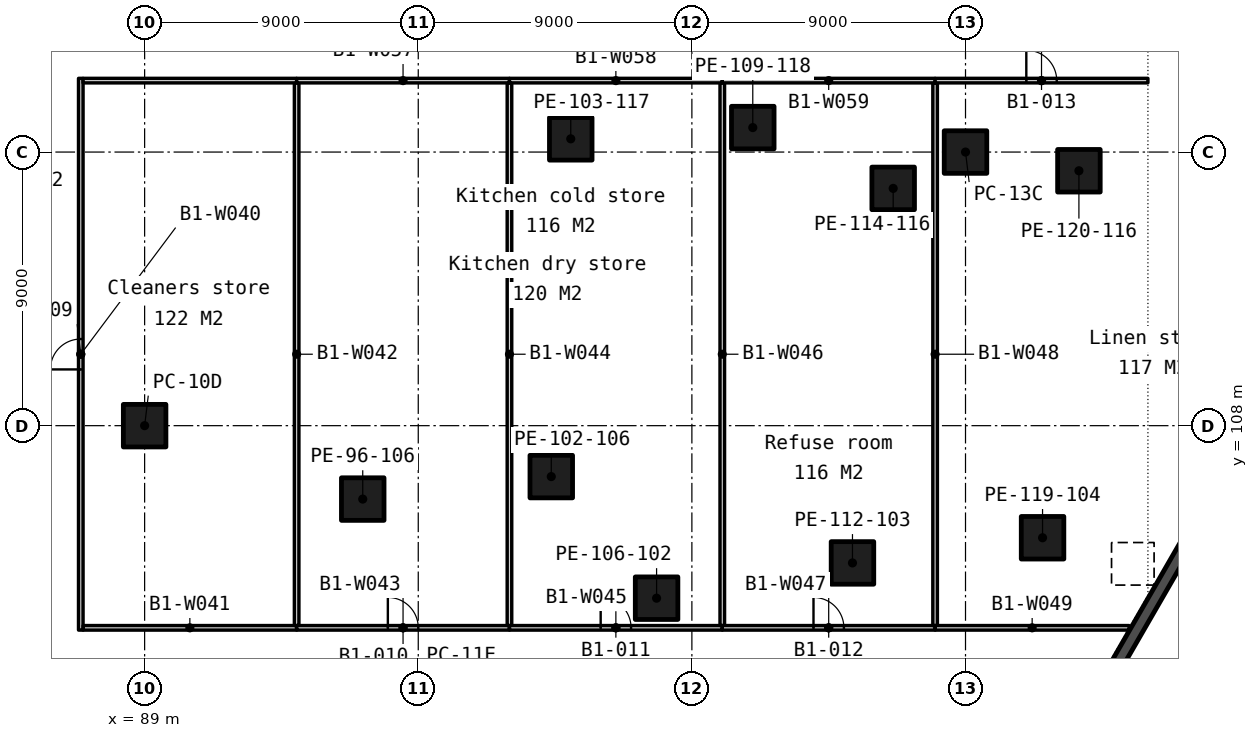
"""IFC4 building model, lengths in metres.
Left out: names, types, materials, properties, quantities, classifications, styles, units other than length and angle.
Written with IfcOpenShell. Run it as: python <this file> out.ifc"""

import sys

from ifc_helpers import new_model, si_unit, direction, frame, frame_2d, origin, origin_2d, place, context, subcontext, project, spatial, rectangle, extrude, element, fill, save


model = new_model("IFC4")
c1 = context("Model", 3, precision=1e-05, world=origin(), true_north=direction((0.0, 1.0)))
c2 = subcontext(c1, "Body", "Model", "MODEL_VIEW")
j1 = project(units=[si_unit("LENGTHUNIT", "METRE"), si_unit("PLANEANGLEUNIT", "RADIAN")], contexts=[c1])
p1 = place(None, origin())
s1 = spatial("IfcSite", under=j1, at=p1, CompositionType="ELEMENT")
p2 = place(p1, origin())
s2 = spatial("IfcBuilding", under=s1, at=p2, CompositionType="ELEMENT")
p3 = place(p2, frame((0.0, 0.0, -4.5)))
s3 = spatial("IfcBuildingStorey", under=s2, at=p3, CompositionType="ELEMENT", Elevation=-4.5)
p4 = place(p3, frame((137.688, 129.089, -0.25), z_axis=(0.0, 0.0, 1.0), x_axis=(-0.499999742059, -0.866025552707, 0.0)))
e1 = element("IfcWall", 1, at=p4, inside=s3, PredefinedType="SOLIDWALL", context=c2, shape_type="SweptSolid", body=[
    extrude(rectangle(XDim=105.659, YDim=0.4, at=frame_2d((52.829, 0.0))), origin(), (0.0, 0.0, 1.0), 4.45),
])
for number, where, z_axis, x_axis in (
    (2, (89.0, 108.0, 0.0), (0.0, 0.0, 1.0), (1.0, 0.0, 0.0)),
    (3, (116.0, 117.0, 0.0), (0.0, 0.0, 1.0), (1.0, 0.0, 0.0)),
    (4, (102.375, 106.325, 0.0), (0.0, 0.0, 1.0), (1.0, 0.0, 0.0)),
    (5, (103.016, 117.435, 0.0), (0.0, 0.0, 1.0), (1.0, 0.0, 0.0)),
    (6, (105.839, 102.325, 0.0), (0.0, 0.0, 1.0), (1.0, 0.0, 0.0)),
    (7, (109.003, 117.805, 0.0), (0.0, 0.0, 1.0), (1.0, 0.0, 0.0)),
    (8, (112.282, 103.485, 0.0), (0.0, 0.0, 1.0), (1.0, 0.0, 0.0)),
    (9, (113.621, 115.805, 0.0), (0.0, 0.0, 1.0), (1.0, 0.0, 0.0)),
    (10, (118.534, 104.313, 0.0), (0.0, 0.0, 1.0), (1.0, 0.0, 0.0)),
    (11, (119.73, 116.385, 0.0), (0.0, 0.0, 1.0), (1.0, 0.0, 0.0)),
    (12, (96.174, 105.585, 0.0), (0.0, 0.0, 1.0), (1.0, 0.0, 0.0)),
):
    element("IfcColumn", number, at=place(p3, frame(where, z_axis=z_axis, x_axis=x_axis)), inside=s3, PredefinedType="COLUMN", context=c2, shape_type="SweptSolid", body=[
        extrude(rectangle(XDim=1.4, YDim=1.4, at=origin_2d()), origin(), (0.0, 0.0, 1.0), 4.5),
    ])
p5 = place(p3, frame((86.9, 101.275, 0.0), z_axis=(0.0, 0.0, 1.0), x_axis=(0.0, 1.0, 0.0)))
e13 = element("IfcWall", 13, at=p5, inside=s3, PredefinedType="PARTITIONING", context=c2, shape_type="SweptSolid", body=[
    extrude(rectangle(XDim=18.15, YDim=0.15, at=frame_2d((9.075, 0.0))), origin(), (0.0, 0.0, 1.0), 4.2),
])
p6 = place(p5, frame((8.575, 0.0, 0.0)))
e14 = element("IfcOpeningElement", 14, at=p6, cuts=e13, PredefinedType="OPENING", context=c2, shape_type="SweptSolid", body=[
    extrude(rectangle(XDim=1.0, YDim=2.1, at=frame_2d((0.5, 1.05))), frame((0.0, 0.085, 0.0), z_axis=(0.0, -1.0, 0.0), x_axis=(1.0, 0.0, 0.0)), (0.0, 0.0, 1.0), 0.17),
])
p7 = place(p3, frame((86.975, 101.35, 0.0), z_axis=(0.0, 0.0, 1.0), x_axis=(1.0, 0.0, 0.0)))
e15 = element("IfcWall", 15, at=p7, inside=s3, PredefinedType="PARTITIONING", context=c2, shape_type="SweptSolid", body=[
    extrude(rectangle(XDim=7.025, YDim=0.15, at=frame_2d((3.512, 0.0))), origin(), (0.0, 0.0, 1.0), 4.2),
])
p8 = place(p3, frame((94.0, 101.425, 0.0), z_axis=(0.0, 0.0, 1.0), x_axis=(0.0, 1.0, 0.0)))
e16 = element("IfcWall", 16, at=p8, inside=s3, PredefinedType="PARTITIONING", context=c2, shape_type="SweptSolid", body=[
    extrude(rectangle(XDim=17.85, YDim=0.15, at=frame_2d((8.925, 0.0))), origin(), (0.0, 0.0, 1.0), 4.2),
])
p9 = place(p3, frame((94.0, 101.35, 0.0), z_axis=(0.0, 0.0, 1.0), x_axis=(1.0, 0.0, 0.0)))
e17 = element("IfcWall", 17, at=p9, inside=s3, PredefinedType="PARTITIONING", context=c2, shape_type="SweptSolid", body=[
    extrude(rectangle(XDim=7.0, YDim=0.15, at=frame_2d((3.5, 0.0))), origin(), (0.0, 0.0, 1.0), 4.2),
])
p10 = place(p9, frame((3.0, 0.0, 0.0)))
e18 = element("IfcOpeningElement", 18, at=p10, cuts=e17, PredefinedType="OPENING", context=c2, shape_type="SweptSolid", body=[
    extrude(rectangle(XDim=1.0, YDim=2.1, at=frame_2d((0.5, 1.05))), frame((0.0, 0.085, 0.0), z_axis=(0.0, -1.0, 0.0), x_axis=(1.0, 0.0, 0.0)), (0.0, 0.0, 1.0), 0.17),
])
p11 = place(p3, frame((101.0, 101.425, 0.0), z_axis=(0.0, 0.0, 1.0), x_axis=(0.0, 1.0, 0.0)))
e19 = element("IfcWall", 19, at=p11, inside=s3, PredefinedType="PARTITIONING", context=c2, shape_type="SweptSolid", body=[
    extrude(rectangle(XDim=17.85, YDim=0.15, at=frame_2d((8.925, 0.0))), origin(), (0.0, 0.0, 1.0), 4.2),
])
p12 = place(p3, frame((101.0, 101.35, 0.0), z_axis=(0.0, 0.0, 1.0), x_axis=(1.0, 0.0, 0.0)))
e20 = element("IfcWall", 20, at=p12, inside=s3, PredefinedType="PARTITIONING", context=c2, shape_type="SweptSolid", body=[
    extrude(rectangle(XDim=7.0, YDim=0.15, at=frame_2d((3.5, 0.0))), origin(), (0.0, 0.0, 1.0), 4.2),
])
p13 = place(p12, frame((3.0, 0.0, 0.0)))
e21 = element("IfcOpeningElement", 21, at=p13, cuts=e20, PredefinedType="OPENING", context=c2, shape_type="SweptSolid", body=[
    extrude(rectangle(XDim=1.0, YDim=2.1, at=frame_2d((0.5, 1.05))), frame((0.0, 0.085, 0.0), z_axis=(0.0, -1.0, 0.0), x_axis=(1.0, 0.0, 0.0)), (0.0, 0.0, 1.0), 0.17),
])
p14 = place(p3, frame((108.0, 101.425, 0.0), z_axis=(0.0, 0.0, 1.0), x_axis=(0.0, 1.0, 0.0)))
e22 = element("IfcWall", 22, at=p14, inside=s3, PredefinedType="PARTITIONING", context=c2, shape_type="SweptSolid", body=[
    extrude(rectangle(XDim=17.85, YDim=0.15, at=frame_2d((8.925, 0.0))), origin(), (0.0, 0.0, 1.0), 4.2),
])
p15 = place(p3, frame((108.0, 101.35, 0.0), z_axis=(0.0, 0.0, 1.0), x_axis=(1.0, 0.0, 0.0)))
e23 = element("IfcWall", 23, at=p15, inside=s3, PredefinedType="PARTITIONING", context=c2, shape_type="SweptSolid", body=[
    extrude(rectangle(XDim=7.0, YDim=0.15, at=frame_2d((3.5, 0.0))), origin(), (0.0, 0.0, 1.0), 4.2),
])
p16 = place(p15, frame((3.0, 0.0, 0.0)))
e24 = element("IfcOpeningElement", 24, at=p16, cuts=e23, PredefinedType="OPENING", context=c2, shape_type="SweptSolid", body=[
    extrude(rectangle(XDim=1.0, YDim=2.1, at=frame_2d((0.5, 1.05))), frame((0.0, 0.085, 0.0), z_axis=(0.0, -1.0, 0.0), x_axis=(1.0, 0.0, 0.0)), (0.0, 0.0, 1.0), 0.17),
])
p17 = place(p3, frame((115.0, 101.425, 0.0), z_axis=(0.0, 0.0, 1.0), x_axis=(0.0, 1.0, 0.0)))
e25 = element("IfcWall", 25, at=p17, inside=s3, PredefinedType="PARTITIONING", context=c2, shape_type="SweptSolid", body=[
    extrude(rectangle(XDim=17.85, YDim=0.15, at=frame_2d((8.925, 0.0))), origin(), (0.0, 0.0, 1.0), 4.2),
])
p18 = place(p3, frame((115.0, 101.35, 0.0), z_axis=(0.0, 0.0, 1.0), x_axis=(1.0, 0.0, 0.0)))
e26 = element("IfcWall", 26, at=p18, inside=s3, PredefinedType="PARTITIONING", context=c2, shape_type="SweptSolid", body=[
    extrude(rectangle(XDim=6.384, YDim=0.15, at=frame_2d((3.192, 0.0))), origin(), (0.0, 0.0, 1.0), 4.2),
])
p19 = place(p3, frame((86.975, 119.35, 0.0), z_axis=(0.0, 0.0, 1.0), x_axis=(1.0, 0.0, 0.0)))
e27 = element("IfcWall", 27, at=p19, inside=s3, PredefinedType="PARTITIONING", context=c2, shape_type="SweptSolid", body=[
    extrude(rectangle(XDim=7.025, YDim=0.15, at=frame_2d((3.512, 0.0))), origin(), (0.0, 0.0, 1.0), 4.2),
])
for number, where, z_axis, x_axis in (
    (28, (94.0, 119.35, 0.0), (0.0, 0.0, 1.0), (1.0, 0.0, 0.0)),
    (29, (101.0, 119.35, 0.0), (0.0, 0.0, 1.0), (1.0, 0.0, 0.0)),
    (30, (108.0, 119.35, 0.0), (0.0, 0.0, 1.0), (1.0, 0.0, 0.0)),
):
    element("IfcWall", number, at=place(p3, frame(where, z_axis=z_axis, x_axis=x_axis)), inside=s3, PredefinedType="PARTITIONING", context=c2, shape_type="SweptSolid", body=[
        extrude(rectangle(XDim=7.0, YDim=0.15, at=frame_2d((3.5, 0.0))), origin(), (0.0, 0.0, 1.0), 4.2),
    ])
p20 = place(p3, frame((115.0, 119.35, 0.0), z_axis=(0.0, 0.0, 1.0), x_axis=(1.0, 0.0, 0.0)))
e31 = element("IfcWall", 31, at=p20, inside=s3, PredefinedType="PARTITIONING", context=c2, shape_type="SweptSolid", body=[
    extrude(rectangle(XDim=7.0, YDim=0.15, at=frame_2d((3.5, 0.0))), origin(), (0.0, 0.0, 1.0), 4.2),
])
p21 = place(p20, frame((3.0, 0.0, 0.0)))
e32 = element("IfcOpeningElement", 32, at=p21, cuts=e31, PredefinedType="OPENING", context=c2, shape_type="SweptSolid", body=[
    extrude(rectangle(XDim=1.0, YDim=2.1, at=frame_2d((0.5, 1.05))), frame((0.0, 0.085, 0.0), z_axis=(0.0, -1.0, 0.0), x_axis=(1.0, 0.0, 0.0)), (0.0, 0.0, 1.0), 0.17),
])
p22 = place(p6, origin())
e33 = element("IfcDoor", 33, at=p22, inside=s3, OperationType="SINGLE_SWING_LEFT", PredefinedType="DOOR", context=c2, shape_type="SweptSolid", body=[
    extrude(rectangle(XDim=1.0, YDim=2.1, at=frame_2d((0.5, 1.05))), frame((0.0, 0.025, 0.0), z_axis=(0.0, -1.0, 0.0), x_axis=(1.0, 0.0, 0.0)), (0.0, 0.0, 1.0), 0.05),
])
fill(e14, e33)
p23 = place(p10, origin())
e34 = element("IfcDoor", 34, at=p23, inside=s3, OperationType="SINGLE_SWING_LEFT", PredefinedType="DOOR", context=c2, shape_type="SweptSolid", body=[
    extrude(rectangle(XDim=1.0, YDim=2.1, at=frame_2d((0.5, 1.05))), frame((0.0, 0.025, 0.0), z_axis=(0.0, -1.0, 0.0), x_axis=(1.0, 0.0, 0.0)), (0.0, 0.0, 1.0), 0.05),
])
fill(e18, e34)
p24 = place(p13, origin())
e35 = element("IfcDoor", 35, at=p24, inside=s3, OperationType="SINGLE_SWING_LEFT", PredefinedType="DOOR", context=c2, shape_type="SweptSolid", body=[
    extrude(rectangle(XDim=1.0, YDim=2.1, at=frame_2d((0.5, 1.05))), frame((0.0, 0.025, 0.0), z_axis=(0.0, -1.0, 0.0), x_axis=(1.0, 0.0, 0.0)), (0.0, 0.0, 1.0), 0.05),
])
fill(e21, e35)
p25 = place(p16, origin())
e36 = element("IfcDoor", 36, at=p25, inside=s3, OperationType="SINGLE_SWING_LEFT", PredefinedType="DOOR", context=c2, shape_type="SweptSolid", body=[
    extrude(rectangle(XDim=1.0, YDim=2.1, at=frame_2d((0.5, 1.05))), frame((0.0, 0.025, 0.0), z_axis=(0.0, -1.0, 0.0), x_axis=(1.0, 0.0, 0.0)), (0.0, 0.0, 1.0), 0.05),
])
fill(e24, e36)
p26 = place(p21, origin())
e37 = element("IfcDoor", 37, at=p26, inside=s3, OperationType="SINGLE_SWING_LEFT", PredefinedType="DOOR", context=c2, shape_type="SweptSolid", body=[
    extrude(rectangle(XDim=1.0, YDim=2.1, at=frame_2d((0.5, 1.05))), frame((0.0, 0.025, 0.0), z_axis=(0.0, -1.0, 0.0), x_axis=(1.0, 0.0, 0.0)), (0.0, 0.0, 1.0), 0.05),
])
fill(e32, e37)
save(model, sys.argv[1])
